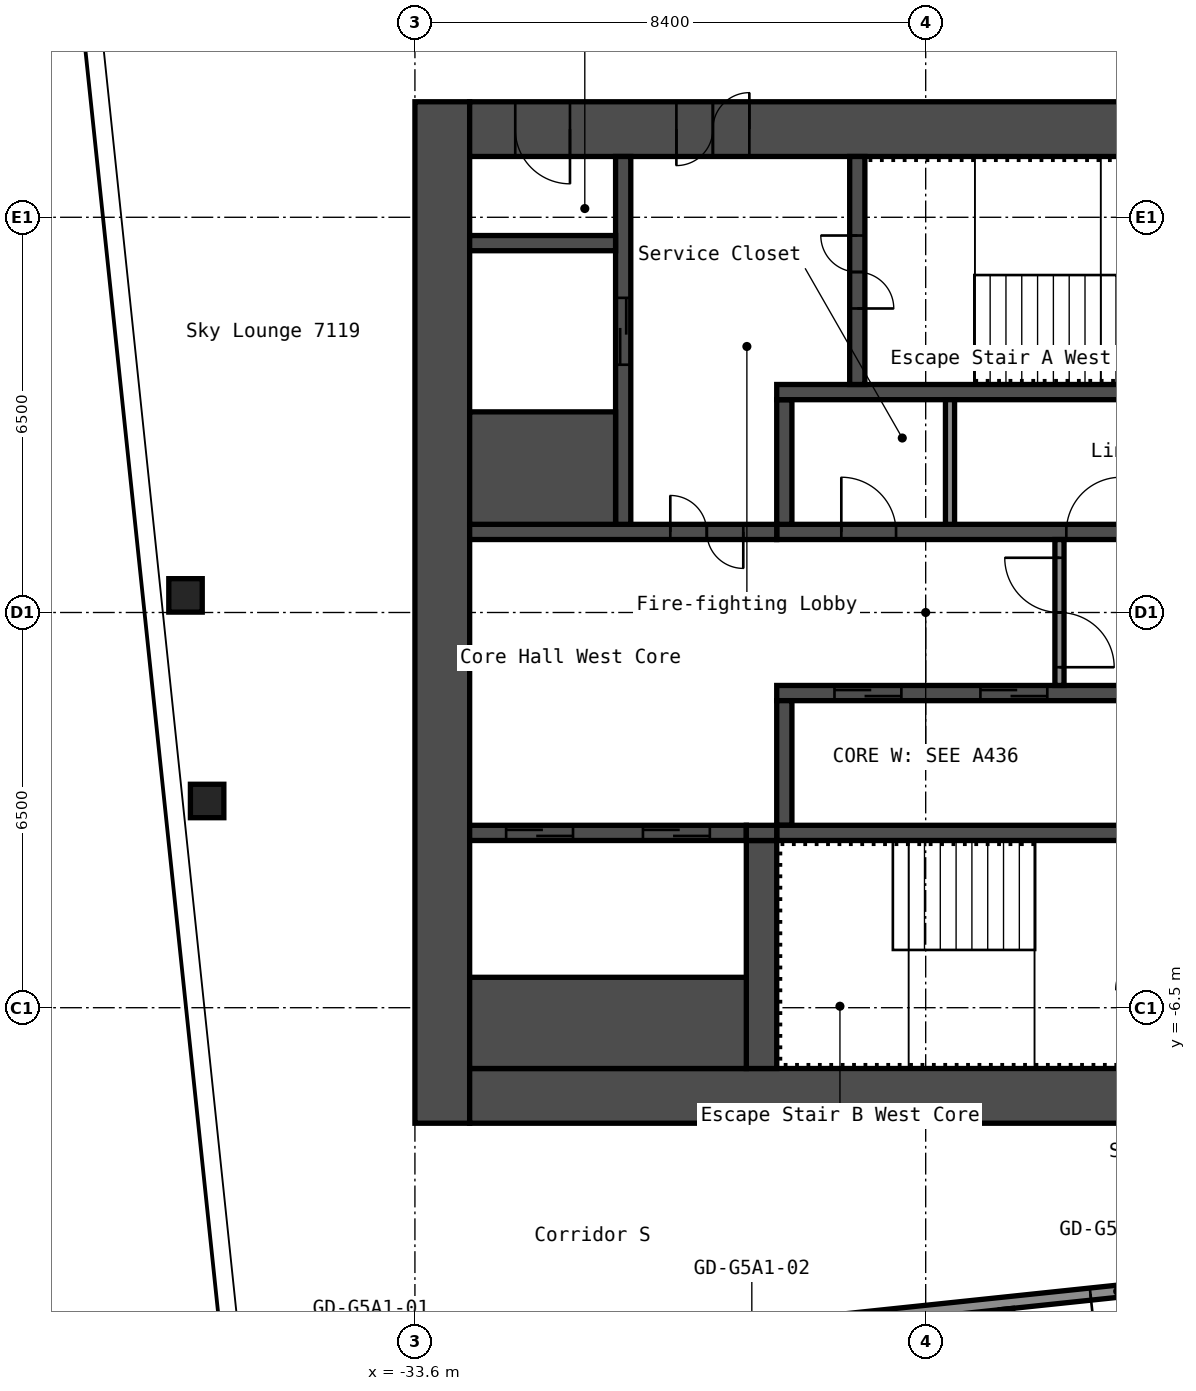
"""IFC4 building model, lengths in metres.
Left out: names, types, materials, properties, quantities, classifications, styles, units other than length and angle.
Written with IfcOpenShell. Run it as: python <this file> out.ifc"""

import sys

from ifc_helpers import new_model, si_unit, direction, frame, frame_2d, origin, origin_2d, place, context, subcontext, project, spatial, rectangle, hollow_rectangle, extrude, element, fill, save


model = new_model("IFC4")
c1 = context("Model", 3, precision=1e-05, world=origin(), true_north=direction((0.0, 1.0)))
c2 = subcontext(c1, "Body", "Model", "MODEL_VIEW")
j1 = project(units=[si_unit("LENGTHUNIT", "METRE"), si_unit("PLANEANGLEUNIT", "RADIAN")], contexts=[c1])
p1 = place(None, origin())
s1 = spatial("IfcSite", under=j1, at=p1, CompositionType="ELEMENT")
p2 = place(p1, origin())
s2 = spatial("IfcBuilding", under=s1, at=p2, CompositionType="ELEMENT")
p3 = place(p2, frame((0.0, 0.0, 251.8)))
s3 = spatial("IfcBuildingStorey", under=s2, at=p3, CompositionType="ELEMENT", Elevation=251.8)
for number, where, z_axis, x_axis in (
    (1, (-37.017, -3.1, 0.0), (0.0, 0.0, 1.0), (1.0, 0.0, 0.0)),
    (2, (-37.373, 0.281, 0.0), (0.0, 0.0, 1.0), (1.0, 0.0, 0.0)),
):
    element("IfcColumn", number, at=place(p3, frame(where, z_axis=z_axis, x_axis=x_axis)), inside=s3, PredefinedType="COLUMN", context=c2, shape_type="SweptSolid", body=[
        extrude(hollow_rectangle(XDim=0.55, YDim=0.55, WallThickness=0.022, InnerFilletRadius=0.033, OuterFilletRadius=0.055, at=origin_2d()), origin(), (0.0, 0.0, 1.0), 2.75),
    ])
p4 = place(p3, frame((-33.15, -8.4, 0.0), z_axis=(0.0, 0.0, 1.0), x_axis=(0.0, 1.0, 0.0)))
e3 = element("IfcWall", 3, at=p4, inside=s3, PredefinedType="SHEAR", context=c2, shape_type="SweptSolid", body=[
    extrude(rectangle(XDim=16.8, YDim=0.9, at=frame_2d((8.4, 0.0))), origin(), (0.0, 0.0, 1.0), 2.75),
])
p5 = place(p3, frame((-32.7, 7.95, 0.0), z_axis=(0.0, 0.0, 1.0), x_axis=(1.0, 0.0, 0.0)))
e4 = element("IfcWall", 4, at=p5, inside=s3, PredefinedType="SHEAR", context=c2, shape_type="SweptSolid", body=[
    extrude(rectangle(XDim=15.0, YDim=0.9, at=frame_2d((7.5, 0.0))), origin(), (0.0, 0.0, 1.0), 2.75),
])
p6 = place(p5, frame((3.4, 0.0, 0.0)))
e5 = element("IfcOpeningElement", 5, at=p6, cuts=e4, PredefinedType="OPENING", context=c2, shape_type="SweptSolid", body=[
    extrude(rectangle(XDim=1.2, YDim=2.1, at=frame_2d((0.6, 1.05))), frame((0.0, 0.46, 0.0), z_axis=(0.0, -1.0, 0.0), x_axis=(1.0, 0.0, 0.0)), (0.0, 0.0, 1.0), 0.92),
])
p7 = place(p5, frame((0.75, 0.0, 0.0)))
e6 = element("IfcOpeningElement", 6, at=p7, cuts=e4, PredefinedType="OPENING", context=c2, shape_type="SweptSolid", body=[
    extrude(rectangle(XDim=0.9, YDim=2.1, at=frame_2d((0.45, 1.05))), frame((0.0, 0.46, 0.0), z_axis=(0.0, -1.0, 0.0), x_axis=(1.0, 0.0, 0.0)), (0.0, 0.0, 1.0), 0.92),
])
p8 = place(p3, frame((-32.7, -7.95, 0.0), z_axis=(0.0, 0.0, 1.0), x_axis=(1.0, 0.0, 0.0)))
e7 = element("IfcWall", 7, at=p8, inside=s3, PredefinedType="SHEAR", context=c2, shape_type="SweptSolid", body=[
    extrude(rectangle(XDim=15.0, YDim=0.9, at=frame_2d((7.5, 0.0))), origin(), (0.0, 0.0, 1.0), 2.75),
])
p9 = place(p8, frame((11.45, 0.0, 0.0)))
e8 = element("IfcOpeningElement", 8, at=p9, cuts=e7, PredefinedType="OPENING", context=c2, shape_type="SweptSolid", body=[
    extrude(rectangle(XDim=1.0, YDim=2.1, at=frame_2d((0.5, 1.05))), frame((0.0, 0.46, 0.0), z_axis=(0.0, -1.0, 0.0), x_axis=(1.0, 0.0, 0.0)), (0.0, 0.0, 1.0), 0.92),
])
p10 = place(p3, frame((-27.65, 1.325, 0.0), z_axis=(0.0, 0.0, 1.0), x_axis=(1.0, 0.0, 0.0)))
e9 = element("IfcWall", 9, at=p10, inside=s3, PredefinedType="SHEAR", context=c2, shape_type="SweptSolid", body=[
    extrude(rectangle(XDim=7.5, YDim=0.25, at=frame_2d((3.75, 0.0))), origin(), (0.0, 0.0, 1.0), 2.75),
])
p11 = place(p10, frame((4.762, 0.0, 0.0)))
e10 = element("IfcOpeningElement", 10, at=p11, cuts=e9, PredefinedType="OPENING", context=c2, shape_type="SweptSolid", body=[
    extrude(rectangle(XDim=0.9, YDim=2.1, at=frame_2d((0.45, 1.05))), frame((0.0, 0.135, 0.0), z_axis=(0.0, -1.0, 0.0), x_axis=(1.0, 0.0, 0.0)), (0.0, 0.0, 1.0), 0.27),
])
p12 = place(p10, frame((1.062, 0.0, 0.0)))
e11 = element("IfcOpeningElement", 11, at=p12, cuts=e9, PredefinedType="OPENING", context=c2, shape_type="SweptSolid", body=[
    extrude(rectangle(XDim=0.9, YDim=2.1, at=frame_2d((0.45, 1.05))), frame((0.0, 0.135, 0.0), z_axis=(0.0, -1.0, 0.0), x_axis=(1.0, 0.0, 0.0)), (0.0, 0.0, 1.0), 0.27),
])
p13 = place(p3, frame((-27.525, 1.45, 0.0), z_axis=(0.0, 0.0, 1.0), x_axis=(0.0, 1.0, 0.0)))
e12 = element("IfcWall", 12, at=p13, inside=s3, PredefinedType="SHEAR", context=c2, shape_type="SweptSolid", body=[
    extrude(rectangle(XDim=2.05, YDim=0.25, at=frame_2d((1.025, 0.0))), origin(), (0.0, 0.0, 1.0), 2.75),
])
p14 = place(p3, frame((-27.65, 3.625, 0.0), z_axis=(0.0, 0.0, 1.0), x_axis=(1.0, 0.0, 0.0)))
e13 = element("IfcWall", 13, at=p14, inside=s3, PredefinedType="SHEAR", context=c2, shape_type="SweptSolid", body=[
    extrude(rectangle(XDim=7.5, YDim=0.25, at=frame_2d((3.75, 0.0))), origin(), (0.0, 0.0, 1.0), 2.75),
])
p15 = place(p3, frame((-26.325, 3.75, 0.0), z_axis=(0.0, 0.0, 1.0), x_axis=(0.0, 1.0, 0.0)))
e14 = element("IfcWall", 14, at=p15, inside=s3, PredefinedType="SHEAR", context=c2, shape_type="SweptSolid", body=[
    extrude(rectangle(XDim=3.75, YDim=0.25, at=frame_2d((1.875, 0.0))), origin(), (0.0, 0.0, 1.0), 2.75),
])
p16 = place(p15, frame((1.25, 0.0, 0.0)))
e15 = element("IfcOpeningElement", 15, at=p16, cuts=e14, PredefinedType="OPENING", context=c2, shape_type="SweptSolid", body=[
    extrude(rectangle(XDim=1.2, YDim=2.1, at=frame_2d((0.6, 1.05))), frame((0.0, 0.135, 0.0), z_axis=(0.0, -1.0, 0.0), x_axis=(1.0, 0.0, 0.0)), (0.0, 0.0, 1.0), 0.27),
])
p17 = place(p3, frame((-32.7, 1.325, 0.0), z_axis=(0.0, 0.0, 1.0), x_axis=(1.0, 0.0, 0.0)))
e16 = element("IfcWall", 16, at=p17, inside=s3, PredefinedType="SHEAR", context=c2, shape_type="SweptSolid", body=[
    extrude(rectangle(XDim=5.05, YDim=0.25, at=frame_2d((2.525, 0.0))), origin(), (0.0, 0.0, 1.0), 2.75),
])
p18 = place(p17, frame((3.3, 0.0, 0.0)))
e17 = element("IfcOpeningElement", 17, at=p18, cuts=e16, PredefinedType="OPENING", context=c2, shape_type="SweptSolid", body=[
    extrude(rectangle(XDim=1.2, YDim=2.1, at=frame_2d((0.6, 1.05))), frame((0.0, 0.135, 0.0), z_axis=(0.0, -1.0, 0.0), x_axis=(1.0, 0.0, 0.0)), (0.0, 0.0, 1.0), 0.27),
])
p19 = place(p3, frame((-30.175, 1.45, 0.0), z_axis=(0.0, 0.0, 1.0), x_axis=(0.0, 1.0, 0.0)))
e18 = element("IfcWall", 18, at=p19, inside=s3, PredefinedType="SHEAR", context=c2, shape_type="SweptSolid", body=[
    extrude(rectangle(XDim=6.05, YDim=0.25, at=frame_2d((3.025, 0.0))), origin(), (0.0, 0.0, 1.0), 2.75),
])
p20 = place(p19, frame((2.625, 0.0, 0.0)))
e19 = element("IfcOpeningElement", 19, at=p20, cuts=e18, PredefinedType="OPENING", context=c2, shape_type="SweptSolid", body=[
    extrude(rectangle(XDim=1.1, YDim=2.1, at=frame_2d((0.55, 1.05))), frame((0.0, 0.135, 0.0), z_axis=(0.0, -1.0, 0.0), x_axis=(1.0, 0.0, 0.0)), (0.0, 0.0, 1.0), 0.27),
])
p21 = place(p3, frame((-32.7, 2.375, 0.0), z_axis=(0.0, 0.0, 1.0), x_axis=(1.0, 0.0, 0.0)))
e20 = element("IfcWall", 20, at=p21, inside=s3, PredefinedType="SHEAR", context=c2, shape_type="SweptSolid", body=[
    extrude(rectangle(XDim=2.4, YDim=1.85, at=frame_2d((1.2, 0.0))), origin(), (0.0, 0.0, 1.0), 2.75),
])
p22 = place(p3, frame((-32.7, 6.075, 0.0), z_axis=(0.0, 0.0, 1.0), x_axis=(1.0, 0.0, 0.0)))
e21 = element("IfcWall", 21, at=p22, inside=s3, PredefinedType="SHEAR", context=c2, shape_type="SweptSolid", body=[
    extrude(rectangle(XDim=2.4, YDim=0.25, at=frame_2d((1.2, 0.0))), origin(), (0.0, 0.0, 1.0), 2.75),
])
p23 = place(p3, frame((-27.65, -1.325, 0.0), z_axis=(0.0, 0.0, 1.0), x_axis=(1.0, 0.0, 0.0)))
e22 = element("IfcWall", 22, at=p23, inside=s3, PredefinedType="SHEAR", context=c2, shape_type="SweptSolid", body=[
    extrude(rectangle(XDim=7.5, YDim=0.25, at=frame_2d((3.75, 0.0))), origin(), (0.0, 0.0, 1.0), 2.75),
])
p24 = place(p23, frame((5.75, 0.0, 0.0)))
e23 = element("IfcOpeningElement", 23, at=p24, cuts=e22, PredefinedType="OPENING", context=c2, shape_type="SweptSolid", body=[
    extrude(rectangle(XDim=1.1, YDim=2.1, at=frame_2d((0.55, 1.05))), frame((0.0, 0.135, 0.0), z_axis=(0.0, -1.0, 0.0), x_axis=(1.0, 0.0, 0.0)), (0.0, 0.0, 1.0), 0.27),
])
p25 = place(p23, frame((3.35, 0.0, 0.0)))
e24 = element("IfcOpeningElement", 24, at=p25, cuts=e22, PredefinedType="OPENING", context=c2, shape_type="SweptSolid", body=[
    extrude(rectangle(XDim=1.1, YDim=2.1, at=frame_2d((0.55, 1.05))), frame((0.0, 0.135, 0.0), z_axis=(0.0, -1.0, 0.0), x_axis=(1.0, 0.0, 0.0)), (0.0, 0.0, 1.0), 0.27),
])
p26 = place(p23, frame((0.95, 0.0, 0.0)))
e25 = element("IfcOpeningElement", 25, at=p26, cuts=e22, PredefinedType="OPENING", context=c2, shape_type="SweptSolid", body=[
    extrude(rectangle(XDim=1.1, YDim=2.1, at=frame_2d((0.55, 1.05))), frame((0.0, 0.135, 0.0), z_axis=(0.0, -1.0, 0.0), x_axis=(1.0, 0.0, 0.0)), (0.0, 0.0, 1.0), 0.27),
])
p27 = place(p3, frame((-27.525, -3.5, 0.0), z_axis=(0.0, 0.0, 1.0), x_axis=(0.0, 1.0, 0.0)))
e26 = element("IfcWall", 26, at=p27, inside=s3, PredefinedType="SHEAR", context=c2, shape_type="SweptSolid", body=[
    extrude(rectangle(XDim=2.05, YDim=0.25, at=frame_2d((1.025, 0.0))), origin(), (0.0, 0.0, 1.0), 2.75),
])
p28 = place(p3, frame((-27.65, -3.625, 0.0), z_axis=(0.0, 0.0, 1.0), x_axis=(1.0, 0.0, 0.0)))
e27 = element("IfcWall", 27, at=p28, inside=s3, PredefinedType="SHEAR", context=c2, shape_type="SweptSolid", body=[
    extrude(rectangle(XDim=7.5, YDim=0.25, at=frame_2d((3.75, 0.0))), origin(), (0.0, 0.0, 1.0), 2.75),
])
p29 = place(p3, frame((-27.9, -7.5, 0.0), z_axis=(0.0, 0.0, 1.0), x_axis=(0.0, 1.0, 0.0)))
e28 = element("IfcWall", 28, at=p29, inside=s3, PredefinedType="SHEAR", context=c2, shape_type="SweptSolid", body=[
    extrude(rectangle(XDim=3.75, YDim=0.5, at=frame_2d((1.875, 0.0))), origin(), (0.0, 0.0, 1.0), 2.75),
])
p30 = place(p3, frame((-32.7, -3.625, 0.0), z_axis=(0.0, 0.0, 1.0), x_axis=(1.0, 0.0, 0.0)))
e29 = element("IfcWall", 29, at=p30, inside=s3, PredefinedType="SHEAR", context=c2, shape_type="SweptSolid", body=[
    extrude(rectangle(XDim=4.55, YDim=0.25, at=frame_2d((2.275, 0.0))), origin(), (0.0, 0.0, 1.0), 2.75),
])
p31 = place(p30, frame((2.85, 0.0, 0.0)))
e30 = element("IfcOpeningElement", 30, at=p31, cuts=e29, PredefinedType="OPENING", context=c2, shape_type="SweptSolid", body=[
    extrude(rectangle(XDim=1.1, YDim=2.1, at=frame_2d((0.55, 1.05))), frame((0.0, 0.135, 0.0), z_axis=(0.0, -1.0, 0.0), x_axis=(1.0, 0.0, 0.0)), (0.0, 0.0, 1.0), 0.27),
])
p32 = place(p30, frame((0.6, 0.0, 0.0)))
e31 = element("IfcOpeningElement", 31, at=p32, cuts=e29, PredefinedType="OPENING", context=c2, shape_type="SweptSolid", body=[
    extrude(rectangle(XDim=1.1, YDim=2.1, at=frame_2d((0.55, 1.05))), frame((0.0, 0.135, 0.0), z_axis=(0.0, -1.0, 0.0), x_axis=(1.0, 0.0, 0.0)), (0.0, 0.0, 1.0), 0.27),
])
p33 = place(p3, frame((-32.7, -6.75, 0.0), z_axis=(0.0, 0.0, 1.0), x_axis=(1.0, 0.0, 0.0)))
e32 = element("IfcWall", 32, at=p33, inside=s3, PredefinedType="SHEAR", context=c2, shape_type="SweptSolid", body=[
    extrude(rectangle(XDim=4.55, YDim=1.5, at=frame_2d((2.275, 0.0))), origin(), (0.0, 0.0, 1.0), 2.75),
])
p34 = place(p3, frame((-28.15, -3.625, 0.0), z_axis=(0.0, 0.0, 1.0), x_axis=(1.0, 0.0, 0.0)))
e33 = element("IfcWall", 33, at=p34, inside=s3, PredefinedType="SHEAR", context=c2, shape_type="SweptSolid", body=[
    extrude(rectangle(XDim=0.5, YDim=0.25, at=frame_2d((0.25, 0.0))), origin(), (0.0, 0.0, 1.0), 2.75),
])
p35 = place(p3, frame((-23.0, -1.2, 0.0), z_axis=(0.0, 0.0, 1.0), x_axis=(0.0, 1.0, 0.0)))
e34 = element("IfcWall", 34, at=p35, inside=s3, PredefinedType="PARTITIONING", context=c2, shape_type="SweptSolid", body=[
    extrude(rectangle(XDim=2.4, YDim=0.15, at=frame_2d((1.2, 0.0))), origin(), (0.0, 0.0, 1.0), 2.75),
])
p36 = place(p35, frame((0.3, 0.0, 0.0)))
e35 = element("IfcOpeningElement", 35, at=p36, cuts=e34, PredefinedType="OPENING", context=c2, shape_type="SweptSolid", body=[
    extrude(rectangle(XDim=1.8, YDim=2.1, at=frame_2d((0.9, 1.05))), frame((0.0, 0.085, 0.0), z_axis=(0.0, -1.0, 0.0), x_axis=(1.0, 0.0, 0.0)), (0.0, 0.0, 1.0), 0.17),
])
p37 = place(p3, frame((-24.8, 1.45, 0.0), z_axis=(0.0, 0.0, 1.0), x_axis=(0.0, 1.0, 0.0)))
e36 = element("IfcWall", 36, at=p37, inside=s3, PredefinedType="PARTITIONING", context=c2, shape_type="SweptSolid", body=[
    extrude(rectangle(XDim=2.05, YDim=0.15, at=frame_2d((1.025, 0.0))), origin(), (0.0, 0.0, 1.0), 2.75),
])
p38 = place(p3, frame((-36.712, -12.705, 0.0), z_axis=(0.0, 0.0, 1.0), x_axis=(0.994522460242, 0.104523088709, 0.0)))
e37 = element("IfcWall", 37, at=p38, inside=s3, PredefinedType="PARTITIONING", context=c2, shape_type="SweptSolid", body=[
    extrude(rectangle(XDim=21.3, YDim=0.2, at=frame_2d((10.65, 0.0))), origin(), (0.0, 0.0, 1.0), 2.75),
])
p39 = place(p38, frame((1.95, 0.0, 0.0)))
e38 = element("IfcOpeningElement", 38, at=p39, cuts=e37, PredefinedType="OPENING", context=c2, shape_type="SweptSolid", body=[
    extrude(rectangle(XDim=0.9, YDim=2.1, at=frame_2d((0.45, 1.05))), frame((0.0, 0.11, 0.0), z_axis=(0.0, -1.0, 0.0), x_axis=(1.0, 0.0, 0.0)), (0.0, 0.0, 1.0), 0.22),
])
p40 = place(p38, frame((8.2, 0.0, 0.0)))
e39 = element("IfcOpeningElement", 39, at=p40, cuts=e37, PredefinedType="OPENING", context=c2, shape_type="SweptSolid", body=[
    extrude(rectangle(XDim=1.0, YDim=2.1, at=frame_2d((0.5, 1.05))), frame((0.0, 0.11, 0.0), z_axis=(0.0, -1.0, 0.0), x_axis=(1.0, 0.0, 0.0)), (0.0, 0.0, 1.0), 0.22),
])
p41 = place(p38, frame((14.3, 0.0, 0.0)))
e40 = element("IfcOpeningElement", 40, at=p41, cuts=e37, PredefinedType="OPENING", context=c2, shape_type="SweptSolid", body=[
    extrude(rectangle(XDim=0.9, YDim=2.1, at=frame_2d((0.45, 1.05))), frame((0.0, 0.11, 0.0), z_axis=(0.0, -1.0, 0.0), x_axis=(1.0, 0.0, 0.0)), (0.0, 0.0, 1.0), 0.22),
])
p42 = place(p38, frame((18.5, 0.0, 0.0)))
e41 = element("IfcOpeningElement", 41, at=p42, cuts=e37, PredefinedType="OPENING", context=c2, shape_type="SweptSolid", body=[
    extrude(rectangle(XDim=0.9, YDim=2.1, at=frame_2d((0.45, 1.05))), frame((0.0, 0.11, 0.0), z_axis=(0.0, -1.0, 0.0), x_axis=(1.0, 0.0, 0.0)), (0.0, 0.0, 1.0), 0.22),
])
p43 = place(p3, frame((-23.254, -17.339, 0.0), z_axis=(0.0, 0.0, 1.0), x_axis=(-0.10453655107, 0.994521045273, 0.0)))
e42 = element("IfcWall", 42, at=p43, inside=s3, PredefinedType="PARTITIONING", context=c2, shape_type="SweptSolid", body=[
    extrude(rectangle(XDim=5.916, YDim=0.2, at=frame_2d((2.958, 0.0))), origin(), (0.0, 0.0, 1.0), 2.75),
])
p44 = place(p6, origin())
e43 = element("IfcDoor", 43, at=p44, inside=s3, OperationType="DOUBLE_DOOR_SINGLE_SWING", PredefinedType="DOOR", context=c2, shape_type="SweptSolid", body=[
    extrude(rectangle(XDim=1.2, YDim=2.1, at=frame_2d((0.6, 1.05))), frame((0.0, 0.025, 0.0), z_axis=(0.0, -1.0, 0.0), x_axis=(1.0, 0.0, 0.0)), (0.0, 0.0, 1.0), 0.05),
])
fill(e5, e43)
p45 = place(p7, origin())
e44 = element("IfcDoor", 44, at=p45, inside=s3, OperationType="SINGLE_SWING_RIGHT", PredefinedType="DOOR", context=c2, shape_type="SweptSolid", body=[
    extrude(rectangle(XDim=0.9, YDim=2.1, at=frame_2d((0.45, 1.05))), frame((0.0, 0.025, 0.0), z_axis=(0.0, -1.0, 0.0), x_axis=(1.0, 0.0, 0.0)), (0.0, 0.0, 1.0), 0.05),
])
fill(e6, e44)
p46 = place(p16, origin())
e45 = element("IfcDoor", 45, at=p46, inside=s3, OperationType="DOUBLE_DOOR_SINGLE_SWING", PredefinedType="DOOR", context=c2, shape_type="SweptSolid", body=[
    extrude(rectangle(XDim=1.2, YDim=2.1, at=frame_2d((0.6, 1.05))), frame((0.0, 0.025, 0.0), z_axis=(0.0, -1.0, 0.0), x_axis=(1.0, 0.0, 0.0)), (0.0, 0.0, 1.0), 0.05),
])
fill(e15, e45)
p47 = place(p18, origin())
e46 = element("IfcDoor", 46, at=p47, inside=s3, OperationType="DOUBLE_DOOR_SINGLE_SWING", PredefinedType="DOOR", context=c2, shape_type="SweptSolid", body=[
    extrude(rectangle(XDim=1.2, YDim=2.1, at=frame_2d((0.6, 1.05))), frame((0.0, 0.025, 0.0), z_axis=(0.0, -1.0, 0.0), x_axis=(1.0, 0.0, 0.0)), (0.0, 0.0, 1.0), 0.05),
])
fill(e17, e46)
p48 = place(p36, origin())
e47 = element("IfcDoor", 47, at=p48, inside=s3, OperationType="DOUBLE_DOOR_SINGLE_SWING", PredefinedType="DOOR", context=c2, shape_type="SweptSolid", body=[
    extrude(rectangle(XDim=1.8, YDim=2.1, at=frame_2d((0.9, 1.05))), frame((0.0, 0.025, 0.0), z_axis=(0.0, -1.0, 0.0), x_axis=(1.0, 0.0, 0.0)), (0.0, 0.0, 1.0), 0.05),
])
fill(e35, e47)
p49 = place(p11, origin())
e48 = element("IfcDoor", 48, at=p49, inside=s3, OperationType="SINGLE_SWING_LEFT", PredefinedType="DOOR", context=c2, shape_type="SweptSolid", body=[
    extrude(rectangle(XDim=0.9, YDim=2.1, at=frame_2d((0.45, 1.05))), frame((0.0, 0.025, 0.0), z_axis=(0.0, -1.0, 0.0), x_axis=(1.0, 0.0, 0.0)), (0.0, 0.0, 1.0), 0.05),
])
fill(e10, e48)
p50 = place(p12, origin())
e49 = element("IfcDoor", 49, at=p50, inside=s3, OperationType="SINGLE_SWING_RIGHT", PredefinedType="DOOR", context=c2, shape_type="SweptSolid", body=[
    extrude(rectangle(XDim=0.9, YDim=2.1, at=frame_2d((0.45, 1.05))), frame((0.0, 0.025, 0.0), z_axis=(0.0, -1.0, 0.0), x_axis=(1.0, 0.0, 0.0)), (0.0, 0.0, 1.0), 0.05),
])
fill(e11, e49)
p51 = place(p25, origin())
e50 = element("IfcDoor", 50, at=p51, inside=s3, OperationType="DOUBLE_DOOR_SLIDING", PredefinedType="DOOR", context=c2, shape_type="SweptSolid", body=[
    extrude(rectangle(XDim=1.1, YDim=2.1, at=frame_2d((0.55, 1.05))), frame((0.0, 0.025, 0.0), z_axis=(0.0, -1.0, 0.0), x_axis=(1.0, 0.0, 0.0)), (0.0, 0.0, 1.0), 0.05),
])
fill(e24, e50)
p52 = place(p26, origin())
e51 = element("IfcDoor", 51, at=p52, inside=s3, OperationType="DOUBLE_DOOR_SLIDING", PredefinedType="DOOR", context=c2, shape_type="SweptSolid", body=[
    extrude(rectangle(XDim=1.1, YDim=2.1, at=frame_2d((0.55, 1.05))), frame((0.0, 0.025, 0.0), z_axis=(0.0, -1.0, 0.0), x_axis=(1.0, 0.0, 0.0)), (0.0, 0.0, 1.0), 0.05),
])
fill(e25, e51)
p53 = place(p20, origin())
e52 = element("IfcDoor", 52, at=p53, inside=s3, OperationType="DOUBLE_DOOR_SLIDING", PredefinedType="DOOR", context=c2, shape_type="SweptSolid", body=[
    extrude(rectangle(XDim=1.1, YDim=2.1, at=frame_2d((0.55, 1.05))), frame((0.0, 0.025, 0.0), z_axis=(0.0, -1.0, 0.0), x_axis=(1.0, 0.0, 0.0)), (0.0, 0.0, 1.0), 0.05),
])
fill(e19, e52)
p54 = place(p31, origin())
e53 = element("IfcDoor", 53, at=p54, inside=s3, OperationType="DOUBLE_DOOR_SLIDING", PredefinedType="DOOR", context=c2, shape_type="SweptSolid", body=[
    extrude(rectangle(XDim=1.1, YDim=2.1, at=frame_2d((0.55, 1.05))), frame((0.0, 0.025, 0.0), z_axis=(0.0, -1.0, 0.0), x_axis=(1.0, 0.0, 0.0)), (0.0, 0.0, 1.0), 0.05),
])
fill(e30, e53)
p55 = place(p32, origin())
e54 = element("IfcDoor", 54, at=p55, inside=s3, OperationType="DOUBLE_DOOR_SLIDING", PredefinedType="DOOR", context=c2, shape_type="SweptSolid", body=[
    extrude(rectangle(XDim=1.1, YDim=2.1, at=frame_2d((0.55, 1.05))), frame((0.0, 0.025, 0.0), z_axis=(0.0, -1.0, 0.0), x_axis=(1.0, 0.0, 0.0)), (0.0, 0.0, 1.0), 0.05),
])
fill(e31, e54)
p56 = place(p41, origin())
e55 = element("IfcDoor", 55, at=p56, inside=s3, OperationType="SINGLE_SWING_LEFT", PredefinedType="DOOR", context=c2, shape_type="SweptSolid", body=[
    extrude(rectangle(XDim=0.9, YDim=2.1, at=frame_2d((0.45, 1.05))), frame((0.0, 0.025, 0.0), z_axis=(0.0, -1.0, 0.0), x_axis=(1.0, 0.0, 0.0)), (0.0, 0.0, 1.0), 0.05),
])
fill(e40, e55)
save(model, sys.argv[1])
